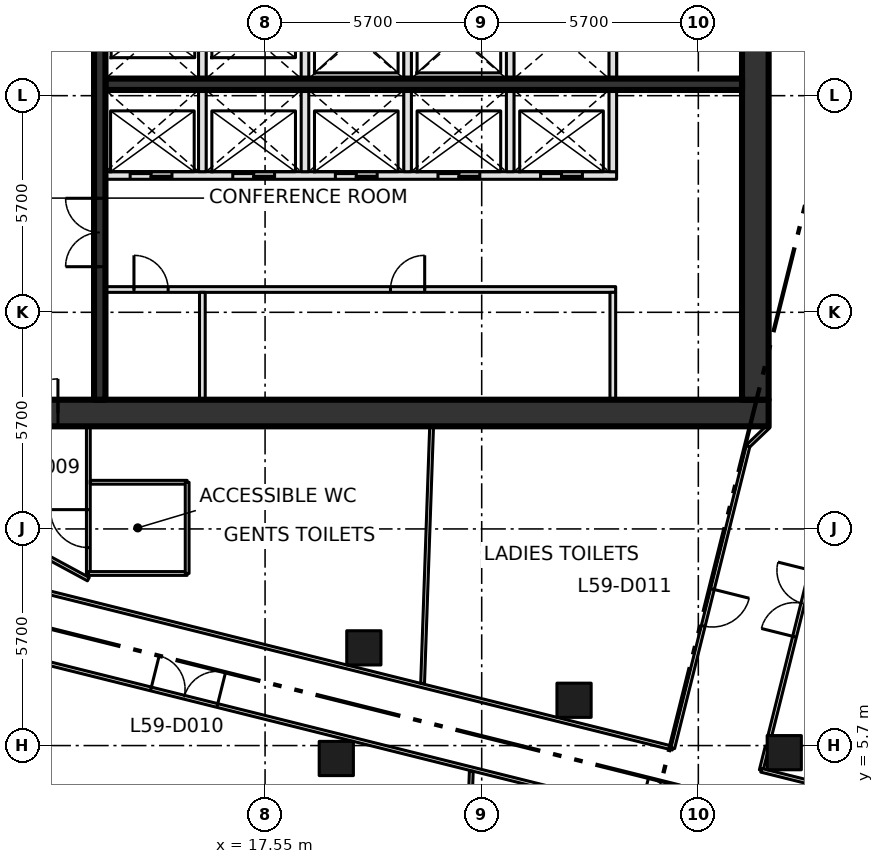
"""IFC4 building model, lengths in metres.
Left out: names, types, materials, properties, quantities, classifications, styles, units other than length and angle.
Written with IfcOpenShell. Run it as: python <this file> out.ifc"""

import sys

from ifc_helpers import new_model, si_unit, direction, frame, frame_2d, origin, origin_2d, place, context, subcontext, project, spatial, rectangle, extrude, element, fill, save


model = new_model("IFC4")
c1 = context("Model", 3, precision=1e-05, world=origin(), true_north=direction((0.0, 1.0)))
c2 = subcontext(c1, "Body", "Model", "MODEL_VIEW")
j1 = project(units=[si_unit("LENGTHUNIT", "METRE"), si_unit("PLANEANGLEUNIT", "RADIAN")], contexts=[c1])
p1 = place(None, origin())
s1 = spatial("IfcSite", under=j1, at=p1, CompositionType="ELEMENT")
p2 = place(p1, origin())
s2 = spatial("IfcBuilding", under=s1, at=p2, CompositionType="ELEMENT")
p3 = place(p2, frame((0.0, 0.0, 259.2)))
s3 = spatial("IfcBuildingStorey", under=s2, at=p3, CompositionType="ELEMENT", Elevation=259.2)
for number, where, z_axis, x_axis in (
    (1, (19.424, 5.36, 0.0), (0.0, 0.0, 1.0), (1.0, 0.0, 0.0)),
    (2, (20.149, 8.271, 0.0), (0.0, 0.0, 1.0), (1.0, 0.0, 0.0)),
    (3, (25.68, 6.892, 0.0), (0.0, 0.0, 1.0), (1.0, 0.0, 0.0)),
    (4, (31.211, 5.513, 0.0), (0.0, 0.0, 1.0), (1.0, 0.0, 0.0)),
):
    element("IfcColumn", number, at=place(p3, frame(where, z_axis=z_axis, x_axis=x_axis)), inside=s3, PredefinedType="COLUMN", context=c2, shape_type="SweptSolid", body=[
        extrude(rectangle(XDim=0.9, YDim=0.9, at=origin_2d()), origin(), (0.0, 0.0, 1.0), 4.2),
    ])
p4 = place(p3, frame((8.0, 14.45, -0.3), z_axis=(0.0, 0.0, 1.0), x_axis=(1.0, 0.0, 0.0)))
e5 = element("IfcWall", 5, at=p4, inside=s3, PredefinedType="SHEAR", context=c2, shape_type="SweptSolid", body=[
    extrude(rectangle(XDim=22.8, YDim=0.7, at=frame_2d((11.4, 0.0))), origin(), (0.0, 0.0, 1.0), 4.2),
])
p5 = place(p4, frame((2.3, 0.0, 0.3)))
e6 = element("IfcOpeningElement", 6, at=p5, cuts=e5, PredefinedType="OPENING", context=c2, shape_type="SweptSolid", body=[
    extrude(rectangle(XDim=1.8, YDim=2.1, at=frame_2d((0.9, 1.05))), frame((0.0, 0.36, 0.0), z_axis=(0.0, -1.0, 0.0), x_axis=(1.0, 0.0, 0.0)), (0.0, 0.0, 1.0), 0.72),
])
p6 = place(p3, frame((30.45, 14.8, -0.3), z_axis=(0.0, 0.0, 1.0), x_axis=(0.0, 1.0, 0.0)))
e7 = element("IfcWall", 7, at=p6, inside=s3, PredefinedType="SHEAR", context=c2, shape_type="SweptSolid", body=[
    extrude(rectangle(XDim=20.9, YDim=0.7, at=frame_2d((10.45, 0.0))), origin(), (0.0, 0.0, 1.0), 4.2),
])
p7 = place(p3, frame((13.35, 17.7, 0.0), z_axis=(0.0, 0.0, 1.0), x_axis=(1.0, 0.0, 0.0)))
e8 = element("IfcWall", 8, at=p7, inside=s3, PredefinedType="PARTITIONING", context=c2, shape_type="SweptSolid", body=[
    extrude(rectangle(XDim=13.425, YDim=0.15, at=frame_2d((6.712, 0.0))), origin(), (0.0, 0.0, 1.0), 3.9),
])
p8 = place(p7, frame((0.75, 0.0, 0.0)))
e9 = element("IfcOpeningElement", 9, at=p8, cuts=e8, PredefinedType="OPENING", context=c2, shape_type="SweptSolid", body=[
    extrude(rectangle(XDim=0.9, YDim=2.1, at=frame_2d((0.45, 1.05))), frame((0.0, 0.085, 0.0), z_axis=(0.0, -1.0, 0.0), x_axis=(1.0, 0.0, 0.0)), (0.0, 0.0, 1.0), 0.17),
])
p9 = place(p7, frame((7.5, 0.0, 0.0)))
e10 = element("IfcOpeningElement", 10, at=p9, cuts=e8, PredefinedType="OPENING", context=c2, shape_type="SweptSolid", body=[
    extrude(rectangle(XDim=0.9, YDim=2.1, at=frame_2d((0.45, 1.05))), frame((0.0, 0.085, 0.0), z_axis=(0.0, -1.0, 0.0), x_axis=(1.0, 0.0, 0.0)), (0.0, 0.0, 1.0), 0.17),
])
p10 = place(p3, frame((13.35, 20.7, 0.0), z_axis=(0.0, 0.0, 1.0), x_axis=(1.0, 0.0, 0.0)))
e11 = element("IfcWall", 11, at=p10, inside=s3, PredefinedType="SOLIDWALL", context=c2, shape_type="SweptSolid", body=[
    extrude(rectangle(XDim=13.45, YDim=0.2, at=frame_2d((6.725, 0.0))), origin(), (0.0, 0.0, 1.0), 3.9),
])
p11 = place(p10, frame((0.65, 0.0, 0.0)))
e12 = element("IfcOpeningElement", 12, at=p11, cuts=e11, PredefinedType="OPENING", context=c2, shape_type="SweptSolid", body=[
    extrude(rectangle(XDim=1.1, YDim=2.1, at=frame_2d((0.55, 1.05))), frame((0.0, 0.11, 0.0), z_axis=(0.0, -1.0, 0.0), x_axis=(1.0, 0.0, 0.0)), (0.0, 0.0, 1.0), 0.22),
])
p12 = place(p10, frame((3.35, 0.0, 0.0)))
e13 = element("IfcOpeningElement", 13, at=p12, cuts=e11, PredefinedType="OPENING", context=c2, shape_type="SweptSolid", body=[
    extrude(rectangle(XDim=1.1, YDim=2.1, at=frame_2d((0.55, 1.05))), frame((0.0, 0.11, 0.0), z_axis=(0.0, -1.0, 0.0), x_axis=(1.0, 0.0, 0.0)), (0.0, 0.0, 1.0), 0.22),
])
p13 = place(p10, frame((6.05, 0.0, 0.0)))
e14 = element("IfcOpeningElement", 14, at=p13, cuts=e11, PredefinedType="OPENING", context=c2, shape_type="SweptSolid", body=[
    extrude(rectangle(XDim=1.1, YDim=2.1, at=frame_2d((0.55, 1.05))), frame((0.0, 0.11, 0.0), z_axis=(0.0, -1.0, 0.0), x_axis=(1.0, 0.0, 0.0)), (0.0, 0.0, 1.0), 0.22),
])
p14 = place(p10, frame((8.75, 0.0, 0.0)))
e15 = element("IfcOpeningElement", 15, at=p14, cuts=e11, PredefinedType="OPENING", context=c2, shape_type="SweptSolid", body=[
    extrude(rectangle(XDim=1.1, YDim=2.1, at=frame_2d((0.55, 1.05))), frame((0.0, 0.11, 0.0), z_axis=(0.0, -1.0, 0.0), x_axis=(1.0, 0.0, 0.0)), (0.0, 0.0, 1.0), 0.22),
])
p15 = place(p10, frame((11.45, 0.0, 0.0)))
e16 = element("IfcOpeningElement", 16, at=p15, cuts=e11, PredefinedType="OPENING", context=c2, shape_type="SweptSolid", body=[
    extrude(rectangle(XDim=1.1, YDim=2.1, at=frame_2d((0.55, 1.05))), frame((0.0, 0.11, 0.0), z_axis=(0.0, -1.0, 0.0), x_axis=(1.0, 0.0, 0.0)), (0.0, 0.0, 1.0), 0.22),
])
p16 = place(p3, frame((13.35, 23.1, 0.0), z_axis=(0.0, 0.0, 1.0), x_axis=(1.0, 0.0, 0.0)))
e17 = element("IfcWall", 17, at=p16, inside=s3, PredefinedType="SHEAR", context=c2, shape_type="SweptSolid", body=[
    extrude(rectangle(XDim=16.75, YDim=0.3, at=frame_2d((8.375, 0.0))), origin(), (0.0, 0.0, 1.0), 3.9),
])
p17 = place(p3, frame((13.2, 14.8, 0.0), z_axis=(0.0, 0.0, 1.0), x_axis=(0.0, 1.0, 0.0)))
e18 = element("IfcWall", 18, at=p17, inside=s3, PredefinedType="SHEAR", context=c2, shape_type="SweptSolid", body=[
    extrude(rectangle(XDim=20.9, YDim=0.3, at=frame_2d((10.45, 0.0))), origin(), (0.0, 0.0, 1.0), 3.9),
])
p18 = place(p17, frame((3.5, 0.0, 0.0)))
e19 = element("IfcOpeningElement", 19, at=p18, cuts=e18, PredefinedType="OPENING", context=c2, shape_type="SweptSolid", body=[
    extrude(rectangle(XDim=1.8, YDim=2.1, at=frame_2d((0.9, 1.05))), frame((0.0, 0.16, 0.0), z_axis=(0.0, -1.0, 0.0), x_axis=(1.0, 0.0, 0.0)), (0.0, 0.0, 1.0), 0.32),
])
p19 = place(p17, frame((11.6, 0.0, 0.0)))
e20 = element("IfcOpeningElement", 20, at=p19, cuts=e18, PredefinedType="OPENING", context=c2, shape_type="SweptSolid", body=[
    extrude(rectangle(XDim=1.2, YDim=2.1, at=frame_2d((0.6, 1.05))), frame((0.0, 0.16, 0.0), z_axis=(0.0, -1.0, 0.0), x_axis=(1.0, 0.0, 0.0)), (0.0, 0.0, 1.0), 0.32),
])
p20 = place(p3, frame((15.9, 14.8, 0.0), z_axis=(0.0, 0.0, 1.0), x_axis=(0.0, 1.0, 0.0)))
e21 = element("IfcWall", 21, at=p20, inside=s3, PredefinedType="PARTITIONING", context=c2, shape_type="SweptSolid", body=[
    extrude(rectangle(XDim=2.825, YDim=0.15, at=frame_2d((1.413, 0.0))), origin(), (0.0, 0.0, 1.0), 3.9),
])
p21 = place(p3, frame((15.9, 20.8, 0.0), z_axis=(0.0, 0.0, 1.0), x_axis=(0.0, 1.0, 0.0)))
e22 = element("IfcWall", 22, at=p21, inside=s3, PredefinedType="SOLIDWALL", context=c2, shape_type="SweptSolid", body=[
    extrude(rectangle(XDim=4.6, YDim=0.2, at=frame_2d((2.3, 0.0))), origin(), (0.0, 0.0, 1.0), 3.9),
])
p22 = place(p3, frame((18.6, 20.8, 0.0), z_axis=(0.0, 0.0, 1.0), x_axis=(0.0, 1.0, 0.0)))
e23 = element("IfcWall", 23, at=p22, inside=s3, PredefinedType="SOLIDWALL", context=c2, shape_type="SweptSolid", body=[
    extrude(rectangle(XDim=7.6, YDim=0.2, at=frame_2d((3.8, 0.0))), origin(), (0.0, 0.0, 1.0), 3.9),
])
p23 = place(p22, frame((5.6, 0.0, 0.0)))
e24 = element("IfcOpeningElement", 24, at=p23, cuts=e23, PredefinedType="OPENING", context=c2, shape_type="SweptSolid", body=[
    extrude(rectangle(XDim=1.2, YDim=2.1, at=frame_2d((0.6, 1.05))), frame((0.0, 0.11, 0.0), z_axis=(0.0, -1.0, 0.0), x_axis=(1.0, 0.0, 0.0)), (0.0, 0.0, 1.0), 0.22),
])
for number, where, z_axis, x_axis in (
    (25, (21.3, 20.8, 0.0), (0.0, 0.0, 1.0), (0.0, 1.0, 0.0)),
    (26, (24.0, 20.8, 0.0), (0.0, 0.0, 1.0), (0.0, 1.0, 0.0)),
):
    element("IfcWall", number, at=place(p3, frame(where, z_axis=z_axis, x_axis=x_axis)), inside=s3, PredefinedType="SOLIDWALL", context=c2, shape_type="SweptSolid", body=[
        extrude(rectangle(XDim=4.6, YDim=0.2, at=frame_2d((2.3, 0.0))), origin(), (0.0, 0.0, 1.0), 3.9),
    ])
p24 = place(p3, frame((26.7, 14.8, 0.0), z_axis=(0.0, 0.0, 1.0), x_axis=(0.0, 1.0, 0.0)))
e27 = element("IfcWall", 27, at=p24, inside=s3, PredefinedType="PARTITIONING", context=c2, shape_type="SweptSolid", body=[
    extrude(rectangle(XDim=2.825, YDim=0.15, at=frame_2d((1.413, 0.0))), origin(), (0.0, 0.0, 1.0), 3.9),
])
p25 = place(p3, frame((26.7, 20.8, 0.0), z_axis=(0.0, 0.0, 1.0), x_axis=(0.0, 1.0, 0.0)))
e28 = element("IfcWall", 28, at=p25, inside=s3, PredefinedType="SOLIDWALL", context=c2, shape_type="SweptSolid", body=[
    extrude(rectangle(XDim=4.6, YDim=0.2, at=frame_2d((2.3, 0.0))), origin(), (0.0, 0.0, 1.0), 3.9),
])
p26 = place(p3, frame((8.55, 8.685, 0.0), z_axis=(0.0, 0.0, 1.0), x_axis=(0.970298026101, -0.241912671319, 0.0)))
e29 = element("IfcWall", 29, at=p26, inside=s3, PredefinedType="PARTITIONING", context=c2, shape_type="SweptSolid", body=[
    extrude(rectangle(XDim=51.275, YDim=0.1, at=frame_2d((25.637, 0.0))), origin(), (0.0, 0.0, 1.0), 3.9),
])
p27 = place(p26, frame((19.45, 0.0, 0.0)))
e30 = element("IfcOpeningElement", 30, at=p27, cuts=e29, PredefinedType="OPENING", context=c2, shape_type="SweptSolid", body=[
    extrude(rectangle(XDim=1.8, YDim=2.1, at=frame_2d((0.9, 1.05))), frame((0.0, 0.06, 0.0), z_axis=(0.0, -1.0, 0.0), x_axis=(1.0, 0.0, 0.0)), (0.0, 0.0, 1.0), 0.12),
])
p28 = place(p26, frame((31.35, 0.0, 0.0)))
e31 = element("IfcOpeningElement", 31, at=p28, cuts=e29, PredefinedType="OPENING", context=c2, shape_type="SweptSolid", body=[
    extrude(rectangle(XDim=1.8, YDim=2.1, at=frame_2d((0.9, 1.05))), frame((0.0, 0.06, 0.0), z_axis=(0.0, -1.0, 0.0), x_axis=(1.0, 0.0, 0.0)), (0.0, 0.0, 1.0), 0.12),
])
p29 = place(p26, frame((6.18, 0.0, 0.0)))
e32 = element("IfcOpeningElement", 32, at=p29, cuts=e29, PredefinedType="OPENING", context=c2, shape_type="SweptSolid", body=[
    extrude(rectangle(XDim=1.8, YDim=2.1, at=frame_2d((0.9, 1.05))), frame((0.0, 0.06, 0.0), z_axis=(0.0, -1.0, 0.0), x_axis=(1.0, 0.0, 0.0)), (0.0, 0.0, 1.0), 0.12),
])
p30 = place(p3, frame((8.988, 10.44, 0.0), z_axis=(0.0, 0.0, 1.0), x_axis=(0.970301223092, -0.241899848006, 0.0)))
e33 = element("IfcWall", 33, at=p30, inside=s3, PredefinedType="PARTITIONING", context=c2, shape_type="SweptSolid", body=[
    extrude(rectangle(XDim=19.879, YDim=0.1, at=frame_2d((9.94, 0.0))), origin(), (0.0, 0.0, 1.0), 3.9),
])
p31 = place(p3, frame((9.9, 11.7, 0.0), z_axis=(0.0, 0.0, 1.0), x_axis=(0.87965147249, -0.475618846291, 0.0)))
e34 = element("IfcWall", 34, at=p31, inside=s3, PredefinedType="PARTITIONING", context=c2, shape_type="SweptSolid", body=[
    extrude(rectangle(XDim=3.41, YDim=0.1, at=frame_2d((1.705, 0.0))), origin(), (0.0, 0.0, 1.0), 3.9),
])
p32 = place(p3, frame((12.9, 10.228, 0.0), z_axis=(0.0, 0.0, 1.0), x_axis=(0.0, 1.0, 0.0)))
e35 = element("IfcWall", 35, at=p32, inside=s3, PredefinedType="PARTITIONING", context=c2, shape_type="SweptSolid", body=[
    extrude(rectangle(XDim=3.872, YDim=0.1, at=frame_2d((1.936, 0.0))), origin(), (0.0, 0.0, 1.0), 3.9),
])
p33 = place(p32, frame((0.68, 0.0, 0.0)))
e36 = element("IfcOpeningElement", 36, at=p33, cuts=e35, PredefinedType="OPENING", context=c2, shape_type="SweptSolid", body=[
    extrude(rectangle(XDim=1.0, YDim=2.1, at=frame_2d((0.5, 1.05))), frame((0.0, 0.06, 0.0), z_axis=(0.0, -1.0, 0.0), x_axis=(1.0, 0.0, 0.0)), (0.0, 0.0, 1.0), 0.12),
])
p34 = place(p3, frame((30.259, 13.583, 0.0), z_axis=(0.0, 0.0, 1.0), x_axis=(-0.241841612879, -0.970315739479, 0.0)))
e37 = element("IfcWall", 37, at=p34, inside=s3, PredefinedType="PARTITIONING", context=c2, shape_type="SweptSolid", body=[
    extrude(rectangle(XDim=8.195, YDim=0.1, at=frame_2d((4.098, 0.0))), origin(), (0.0, 0.0, 1.0), 3.9),
])
p35 = place(p34, frame((3.88, 0.0, 0.0)))
e38 = element("IfcOpeningElement", 38, at=p35, cuts=e37, PredefinedType="OPENING", context=c2, shape_type="SweptSolid", body=[
    extrude(rectangle(XDim=1.0, YDim=2.1, at=frame_2d((0.5, 1.05))), frame((0.0, 0.06, 0.0), z_axis=(0.0, -1.0, 0.0), x_axis=(1.0, 0.0, 0.0)), (0.0, 0.0, 1.0), 0.12),
])
p36 = place(p3, frame((30.605, 5.05, 0.0), z_axis=(0.0, 0.0, 1.0), x_axis=(0.241823201882, 0.970320328052, 0.0)))
e39 = element("IfcWall", 39, at=p36, inside=s3, PredefinedType="PARTITIONING", context=c2, shape_type="SweptSolid", body=[
    extrude(rectangle(XDim=0.645, YDim=0.1, at=frame_2d((0.323, 0.0))), origin(), (0.0, 0.0, 1.0), 3.9),
])
p37 = place(p3, frame((30.8, 14.1, 0.0), z_axis=(0.0, 0.0, 1.0), x_axis=(-0.722911025189, -0.690941133281, 0.0)))
e40 = element("IfcWall", 40, at=p37, inside=s3, PredefinedType="PARTITIONING", context=c2, shape_type="SweptSolid", body=[
    extrude(rectangle(XDim=0.748, YDim=0.1, at=frame_2d((0.374, 0.0))), origin(), (0.0, 0.0, 1.0), 3.9),
])
p38 = place(p3, frame((30.833, 5.963, 0.0), z_axis=(0.0, 0.0, 1.0), x_axis=(0.241902093757, 0.970300663215, 0.0)))
e41 = element("IfcWall", 41, at=p38, inside=s3, PredefinedType="PARTITIONING", context=c2, shape_type="SweptSolid", body=[
    extrude(rectangle(XDim=7.255, YDim=0.1, at=frame_2d((3.627, 0.0))), origin(), (0.0, 0.0, 1.0), 3.9),
])
p39 = place(p38, frame((2.68, 0.0, 0.0)))
e42 = element("IfcOpeningElement", 42, at=p39, cuts=e41, PredefinedType="OPENING", context=c2, shape_type="SweptSolid", body=[
    extrude(rectangle(XDim=1.8, YDim=2.1, at=frame_2d((0.9, 1.05))), frame((0.0, 0.06, 0.0), z_axis=(0.0, -1.0, 0.0), x_axis=(1.0, 0.0, 0.0)), (0.0, 0.0, 1.0), 0.12),
])
p40 = place(p3, frame((49.551, 0.327, 0.0), z_axis=(0.0, 0.0, 1.0), x_axis=(-0.970303359745, 0.241891277369, 0.0)))
e43 = element("IfcWall", 43, at=p40, inside=s3, PredefinedType="PARTITIONING", context=c2, shape_type="SweptSolid", body=[
    extrude(rectangle(XDim=19.526, YDim=0.1, at=frame_2d((9.763, 0.0))), origin(), (0.0, 0.0, 1.0), 3.9),
])
p41 = place(p3, frame((12.95, 12.628, 0.0), z_axis=(0.0, 0.0, 1.0), x_axis=(1.0, 0.0, 0.0)))
e44 = element("IfcWall", 44, at=p41, inside=s3, PredefinedType="PARTITIONING", context=c2, shape_type="SweptSolid", body=[
    extrude(rectangle(XDim=2.55, YDim=0.1, at=frame_2d((1.275, 0.0))), origin(), (0.0, 0.0, 1.0), 3.9),
])
p42 = place(p3, frame((15.5, 10.228, 0.0), z_axis=(0.0, 0.0, 1.0), x_axis=(-1.0, 0.0, 0.0)))
e45 = element("IfcWall", 45, at=p42, inside=s3, PredefinedType="PARTITIONING", context=c2, shape_type="SweptSolid", body=[
    extrude(rectangle(XDim=2.6, YDim=0.1, at=frame_2d((1.3, 0.0))), origin(), (0.0, 0.0, 1.0), 3.9),
])
p43 = place(p3, frame((15.5, 12.628, 0.0), z_axis=(0.0, 0.0, 1.0), x_axis=(0.0, -1.0, 0.0)))
e46 = element("IfcWall", 46, at=p43, inside=s3, PredefinedType="PARTITIONING", context=c2, shape_type="SweptSolid", body=[
    extrude(rectangle(XDim=2.4, YDim=0.1, at=frame_2d((1.2, 0.0))), origin(), (0.0, 0.0, 1.0), 3.9),
])
p44 = place(p3, frame((21.695, 7.334, 0.0), z_axis=(0.0, 0.0, 1.0), x_axis=(0.034978942342, 0.999388049555, 0.0)))
e47 = element("IfcWall", 47, at=p44, inside=s3, PredefinedType="PARTITIONING", context=c2, shape_type="SweptSolid", body=[
    extrude(rectangle(XDim=6.77, YDim=0.1, at=frame_2d((3.385, 0.0))), origin(), (0.0, 0.0, 1.0), 3.9),
])
p45 = place(p3, frame((22.641, -4.567, 0.0), z_axis=(0.0, 0.0, 1.0), x_axis=(0.034896781654, 0.999390921827, 0.0)))
e48 = element("IfcWall", 48, at=p45, inside=s3, PredefinedType="PARTITIONING", context=c2, shape_type="SweptSolid", body=[
    extrude(rectangle(XDim=9.599, YDim=0.1, at=frame_2d((4.799, 0.0))), origin(), (0.0, 0.0, 1.0), 3.9),
])
p46 = place(p11, origin())
e49 = element("IfcDoor", 49, at=p46, inside=s3, OperationType="SLIDING_TO_LEFT", PredefinedType="DOOR", context=c2, shape_type="SweptSolid", body=[
    extrude(rectangle(XDim=1.1, YDim=2.1, at=frame_2d((0.55, 1.05))), frame((0.0, 0.025, 0.0), z_axis=(0.0, -1.0, 0.0), x_axis=(1.0, 0.0, 0.0)), (0.0, 0.0, 1.0), 0.05),
])
fill(e12, e49)
p47 = place(p12, origin())
e50 = element("IfcDoor", 50, at=p47, inside=s3, OperationType="SLIDING_TO_LEFT", PredefinedType="DOOR", context=c2, shape_type="SweptSolid", body=[
    extrude(rectangle(XDim=1.1, YDim=2.1, at=frame_2d((0.55, 1.05))), frame((0.0, 0.025, 0.0), z_axis=(0.0, -1.0, 0.0), x_axis=(1.0, 0.0, 0.0)), (0.0, 0.0, 1.0), 0.05),
])
fill(e13, e50)
p48 = place(p13, origin())
e51 = element("IfcDoor", 51, at=p48, inside=s3, OperationType="SLIDING_TO_LEFT", PredefinedType="DOOR", context=c2, shape_type="SweptSolid", body=[
    extrude(rectangle(XDim=1.1, YDim=2.1, at=frame_2d((0.55, 1.05))), frame((0.0, 0.025, 0.0), z_axis=(0.0, -1.0, 0.0), x_axis=(1.0, 0.0, 0.0)), (0.0, 0.0, 1.0), 0.05),
])
fill(e14, e51)
p49 = place(p14, origin())
e52 = element("IfcDoor", 52, at=p49, inside=s3, OperationType="SLIDING_TO_LEFT", PredefinedType="DOOR", context=c2, shape_type="SweptSolid", body=[
    extrude(rectangle(XDim=1.1, YDim=2.1, at=frame_2d((0.55, 1.05))), frame((0.0, 0.025, 0.0), z_axis=(0.0, -1.0, 0.0), x_axis=(1.0, 0.0, 0.0)), (0.0, 0.0, 1.0), 0.05),
])
fill(e15, e52)
p50 = place(p15, origin())
e53 = element("IfcDoor", 53, at=p50, inside=s3, OperationType="SLIDING_TO_LEFT", PredefinedType="DOOR", context=c2, shape_type="SweptSolid", body=[
    extrude(rectangle(XDim=1.1, YDim=2.1, at=frame_2d((0.55, 1.05))), frame((0.0, 0.025, 0.0), z_axis=(0.0, -1.0, 0.0), x_axis=(1.0, 0.0, 0.0)), (0.0, 0.0, 1.0), 0.05),
])
fill(e16, e53)
p51 = place(p8, origin())
e54 = element("IfcDoor", 54, at=p51, inside=s3, OperationType="SINGLE_SWING_LEFT", PredefinedType="DOOR", context=c2, shape_type="SweptSolid", body=[
    extrude(rectangle(XDim=0.9, YDim=2.1, at=frame_2d((0.45, 1.05))), frame((0.0, 0.025, 0.0), z_axis=(0.0, -1.0, 0.0), x_axis=(1.0, 0.0, 0.0)), (0.0, 0.0, 1.0), 0.05),
])
fill(e9, e54)
p52 = place(p9, origin())
e55 = element("IfcDoor", 55, at=p52, inside=s3, OperationType="SINGLE_SWING_RIGHT", PredefinedType="DOOR", context=c2, shape_type="SweptSolid", body=[
    extrude(rectangle(XDim=0.9, YDim=2.1, at=frame_2d((0.45, 1.05))), frame((0.0, 0.025, 0.0), z_axis=(0.0, -1.0, 0.0), x_axis=(1.0, 0.0, 0.0)), (0.0, 0.0, 1.0), 0.05),
])
fill(e10, e55)
p53 = place(p18, origin())
e56 = element("IfcDoor", 56, at=p53, inside=s3, OperationType="DOUBLE_DOOR_SINGLE_SWING", PredefinedType="DOOR", context=c2, shape_type="SweptSolid", body=[
    extrude(rectangle(XDim=1.8, YDim=2.1, at=frame_2d((0.9, 1.05))), frame((0.0, 0.025, 0.0), z_axis=(0.0, -1.0, 0.0), x_axis=(1.0, 0.0, 0.0)), (0.0, 0.0, 1.0), 0.05),
])
fill(e19, e56)
p54 = place(p5, origin())
e57 = element("IfcDoor", 57, at=p54, inside=s3, OperationType="DOUBLE_DOOR_SINGLE_SWING", PredefinedType="DOOR", context=c2, shape_type="SweptSolid", body=[
    extrude(rectangle(XDim=1.8, YDim=2.1, at=frame_2d((0.9, 1.05))), frame((0.0, 0.025, 0.0), z_axis=(0.0, -1.0, 0.0), x_axis=(1.0, 0.0, 0.0)), (0.0, 0.0, 1.0), 0.05),
])
fill(e6, e57)
p55 = place(p33, origin())
e58 = element("IfcDoor", 58, at=p55, inside=s3, OperationType="SINGLE_SWING_RIGHT", PredefinedType="DOOR", context=c2, shape_type="SweptSolid", body=[
    extrude(rectangle(XDim=1.0, YDim=2.1, at=frame_2d((0.5, 1.05))), frame((0.0, 0.025, 0.0), z_axis=(0.0, -1.0, 0.0), x_axis=(1.0, 0.0, 0.0)), (0.0, 0.0, 1.0), 0.05),
])
fill(e36, e58)
p56 = place(p29, origin())
e59 = element("IfcDoor", 59, at=p56, inside=s3, OperationType="DOUBLE_DOOR_SINGLE_SWING", PredefinedType="DOOR", context=c2, shape_type="SweptSolid", body=[
    extrude(rectangle(XDim=1.8, YDim=2.1, at=frame_2d((0.9, 1.05))), frame((0.0, 0.025, 0.0), z_axis=(0.0, -1.0, 0.0), x_axis=(1.0, 0.0, 0.0)), (0.0, 0.0, 1.0), 0.05),
])
fill(e32, e59)
p57 = place(p35, origin())
e60 = element("IfcDoor", 60, at=p57, inside=s3, OperationType="SINGLE_SWING_LEFT", PredefinedType="DOOR", context=c2, shape_type="SweptSolid", body=[
    extrude(rectangle(XDim=1.0, YDim=2.1, at=frame_2d((0.5, 1.05))), frame((0.0, 0.025, 0.0), z_axis=(0.0, -1.0, 0.0), x_axis=(1.0, 0.0, 0.0)), (0.0, 0.0, 1.0), 0.05),
])
fill(e38, e60)
p58 = place(p39, origin())
e61 = element("IfcDoor", 61, at=p58, inside=s3, OperationType="DOUBLE_DOOR_SINGLE_SWING", PredefinedType="DOOR", context=c2, shape_type="SweptSolid", body=[
    extrude(rectangle(XDim=1.8, YDim=2.1, at=frame_2d((0.9, 1.05))), frame((0.0, 0.025, 0.0), z_axis=(0.0, -1.0, 0.0), x_axis=(1.0, 0.0, 0.0)), (0.0, 0.0, 1.0), 0.05),
])
fill(e42, e61)
save(model, sys.argv[1])
